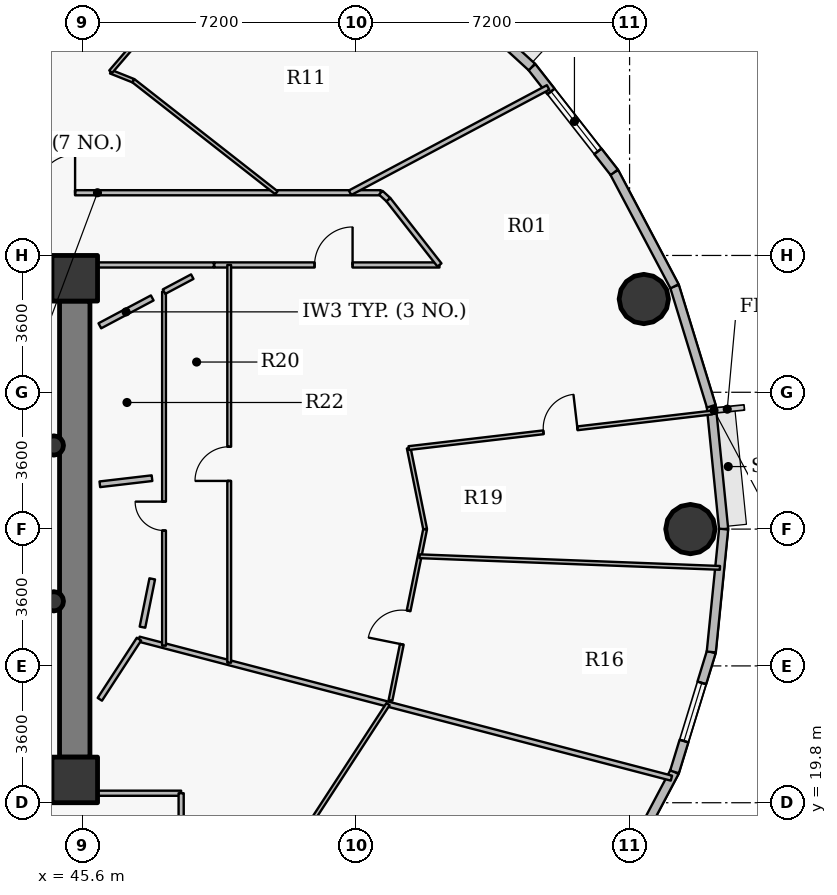
"""IFC4 building model, lengths in metres.
Left out: names, types, materials, properties, quantities, classifications, styles, units other than length and angle.
Written with IfcOpenShell. Run it as: python <this file> out.ifc"""

import sys

from ifc_helpers import new_model, si_unit, direction, frame, frame_2d, origin, origin_2d, place, context, subcontext, project, spatial, rectangle, hollow_circle, extrude, source, transform, mapped, element, fill, save


model = new_model("IFC4")
c1 = context("Model", 3, precision=1e-05, world=origin(), true_north=direction((0.0, 1.0)))
c2 = subcontext(c1, "Body", "Model", "MODEL_VIEW")
j1 = project(units=[si_unit("LENGTHUNIT", "METRE"), si_unit("PLANEANGLEUNIT", "RADIAN")], contexts=[c1])
p1 = place(None, origin())
s1 = spatial("IfcSite", under=j1, at=p1, CompositionType="ELEMENT")
p2 = place(p1, origin())
s2 = spatial("IfcBuilding", under=s1, at=p2, CompositionType="ELEMENT")
p3 = place(p2, frame((0.0, 0.0, 182.4)))
s3 = spatial("IfcBuildingStorey", under=s2, at=p3, CompositionType="ELEMENT", Elevation=182.4)
for number, where, z_axis, x_axis in (
    (1, (45.4, 20.4, 0.0), (0.0, 0.0, 1.0), (1.0, 0.0, 0.0)),
    (2, (45.4, 33.6, 0.0), (0.0, 0.0, 1.0), (1.0, 0.0, 0.0)),
):
    element("IfcColumn", number, at=place(p3, frame(where, z_axis=z_axis, x_axis=x_axis)), inside=s3, PredefinedType="COLUMN", context=c2, shape_type="SweptSolid", body=[
        extrude(rectangle(XDim=1.2, YDim=1.2, at=origin_2d()), origin(), (0.0, 0.0, 1.0), 3.75),
    ])
p4 = place(p3, frame((45.4, 33.0, 0.0), z_axis=(0.0, 0.0, 1.0), x_axis=(0.0, -1.0, 0.0)))
e3 = element("IfcWall", 3, at=p4, inside=s3, PredefinedType="SHEAR", context=c2, shape_type="SweptSolid", body=[
    extrude(rectangle(XDim=12.0, YDim=0.8, at=frame_2d((6.0, 0.0))), origin(), (0.0, 0.0, 1.0), 2.95),
])
for number, where, z_axis, x_axis in (
    (4, (61.6, 27.0, 0.0), (0.0, 0.0, 1.0), (1.0, 0.0, 0.0)),
    (5, (60.375, 33.053, 0.0), (0.0, 0.0, 1.0), (1.0, 0.0, 0.0)),
):
    element("IfcColumn", number, at=place(p3, frame(where, z_axis=z_axis, x_axis=x_axis)), inside=s3, PredefinedType="COLUMN", context=c2, shape_type="SweptSolid", body=[
        extrude(hollow_circle(Radius=0.65, WallThickness=0.04, at=origin_2d()), origin(), (0.0, 0.0, 1.0), 3.75),
    ])
for number, where, z_axis, x_axis in (
    (6, (44.85, 25.1, 0.0), (0.0, 0.0, 1.0), (1.0, 0.0, 0.0)),
    (7, (44.85, 29.2, 0.0), (0.0, 0.0, 1.0), (1.0, 0.0, 0.0)),
):
    element("IfcColumn", number, at=place(p3, frame(where, z_axis=z_axis, x_axis=x_axis)), inside=s3, PredefinedType="COLUMN", context=c2, shape_type="SweptSolid", body=[
        extrude(hollow_circle(Radius=0.254, WallThickness=0.02, at=origin_2d()), origin(), (0.0, 0.0, 1.0), 3.75),
    ])
p5 = place(p3, frame((62.15, 30.234, 0.0), z_axis=(0.0, 0.0, 1.0), x_axis=(0.100061534614, -0.994981250723, 0.0)))
e8 = element("IfcWall", 8, at=p5, inside=s3, PredefinedType="SOLIDWALL", context=c2, shape_type="SweptSolid", body=[
    extrude(rectangle(XDim=3.25, YDim=0.24, at=frame_2d((1.625, 0.0))), origin(), (0.0, 0.0, 1.0), 3.5),
])
p6 = place(p3, frame((61.183, 33.389, 0.0), z_axis=(0.0, 0.0, 1.0), x_axis=(0.293097995113, -0.956082405058, 0.0)))
e9 = element("IfcWall", 9, at=p6, inside=s3, PredefinedType="SOLIDWALL", context=c2, shape_type="SweptSolid", body=[
    extrude(rectangle(XDim=3.3, YDim=0.24, at=frame_2d((1.65, 0.0))), origin(), (0.0, 0.0, 1.0), 3.5),
])
p7 = place(p3, frame((59.596, 36.388, 0.0), z_axis=(0.0, 0.0, 1.0), x_axis=(0.467586874938, -0.88394712194, 0.0)))
e10 = element("IfcWall", 10, at=p7, inside=s3, PredefinedType="SOLIDWALL", context=c2, shape_type="SweptSolid", body=[
    extrude(rectangle(XDim=3.393, YDim=0.24, at=frame_2d((1.697, 0.0))), origin(), (0.0, 0.0, 1.0), 3.5),
])
p8 = place(p3, frame((57.428, 39.158, 0.0), z_axis=(0.0, 0.0, 1.0), x_axis=(0.616287674549, -0.787521112224, 0.0)))
e11 = element("IfcWall", 11, at=p8, inside=s3, PredefinedType="SOLIDWALL", context=c2, shape_type="SweptSolid", body=[
    extrude(rectangle(XDim=3.517, YDim=0.24, at=frame_2d((1.759, 0.0))), origin(), (0.0, 0.0, 1.0), 3.5),
])
p9 = place(p8, frame((0.819, 0.0, 0.9)))
e12 = element("IfcOpeningElement", 12, at=p9, cuts=e11, PredefinedType="OPENING", context=c2, shape_type="SweptSolid", body=[
    extrude(rectangle(XDim=2.0, YDim=1.75, at=origin_2d()), frame((1.0, 0.13, 0.875), z_axis=(0.0, -1.0, 0.0), x_axis=(1.0, 0.0, 0.0)), (0.0, 0.0, 1.0), 0.26),
])
p10 = place(p3, frame((54.732, 41.631, 0.0), z_axis=(0.0, 0.0, 1.0), x_axis=(0.737076565834, -0.675809245349, 0.0)))
e13 = element("IfcWall", 13, at=p10, inside=s3, PredefinedType="SOLIDWALL", context=c2, shape_type="SweptSolid", body=[
    extrude(rectangle(XDim=3.658, YDim=0.24, at=frame_2d((1.829, 0.0))), origin(), (0.0, 0.0, 1.0), 3.5),
])
p11 = place(p3, frame((61.183, 20.611, 0.0), z_axis=(0.0, 0.0, 1.0), x_axis=(-0.467586874938, -0.88394712194, 0.0)))
e14 = element("IfcWall", 14, at=p11, inside=s3, PredefinedType="SOLIDWALL", context=c2, shape_type="SweptSolid", body=[
    extrude(rectangle(XDim=3.393, YDim=0.24, at=frame_2d((1.697, 0.0))), origin(), (0.0, 0.0, 1.0), 3.5),
])
p12 = place(p3, frame((62.15, 23.766, 0.0), z_axis=(0.0, 0.0, 1.0), x_axis=(-0.293097995113, -0.956082405058, 0.0)))
e15 = element("IfcWall", 15, at=p12, inside=s3, PredefinedType="SOLIDWALL", context=c2, shape_type="SweptSolid", body=[
    extrude(rectangle(XDim=3.3, YDim=0.24, at=frame_2d((1.65, 0.0))), origin(), (0.0, 0.0, 1.0), 3.5),
])
p13 = place(p12, frame((0.85, 0.0, 0.9)))
e16 = element("IfcOpeningElement", 16, at=p13, cuts=e15, PredefinedType="OPENING", context=c2, shape_type="SweptSolid", body=[
    extrude(rectangle(XDim=1.6, YDim=1.75, at=origin_2d()), frame((0.8, 0.13, 0.875), z_axis=(0.0, -1.0, 0.0), x_axis=(1.0, 0.0, 0.0)), (0.0, 0.0, 1.0), 0.26),
])
p14 = place(p3, frame((62.475, 27.0, 0.0), z_axis=(0.0, 0.0, 1.0), x_axis=(-0.100061534614, -0.994981250723, 0.0)))
e17 = element("IfcWall", 17, at=p14, inside=s3, PredefinedType="SOLIDWALL", context=c2, shape_type="SweptSolid", body=[
    extrude(rectangle(XDim=3.25, YDim=0.24, at=frame_2d((1.625, 0.0))), origin(), (0.0, 0.0, 1.0), 3.5),
])
p15 = place(p3, frame((38.541, 35.85, 0.0), z_axis=(0.0, 0.0, 1.0), x_axis=(1.0, 0.0, 0.0)))
e18 = element("IfcWall", 18, at=p15, inside=s3, PredefinedType="PARTITIONING", context=c2, shape_type="SweptSolid", body=[
    extrude(rectangle(XDim=14.913, YDim=0.135, at=frame_2d((7.456, 0.0))), origin(), (0.0, 0.0, 1.0), 2.935),
])
p16 = place(p15, frame((5.868, 0.0, 0.0)))
e19 = element("IfcOpeningElement", 19, at=p16, cuts=e18, PredefinedType="OPENING", context=c2, shape_type="SweptSolid", body=[
    extrude(rectangle(XDim=1.0, YDim=2.15, at=origin_2d()), frame((0.5, 0.078, 1.075), z_axis=(0.0, -1.0, 0.0), x_axis=(1.0, 0.0, 0.0)), (0.0, 0.0, 1.0), 0.155),
])
p17 = place(p3, frame((45.8, 20.05, 0.0), z_axis=(0.0, 0.0, 1.0), x_axis=(1.0, 0.0, 0.0)))
e20 = element("IfcWall", 20, at=p17, inside=s3, PredefinedType="PARTITIONING", context=c2, shape_type="SweptSolid", body=[
    extrude(rectangle(XDim=2.4, YDim=0.135, at=frame_2d((1.2, 0.0))), origin(), (0.0, 0.0, 1.0), 3.5),
])
p18 = place(p3, frame((46.346, 39.035, 0.0), z_axis=(0.0, 0.0, 1.0), x_axis=(0.928841988182, -0.370476127423, 0.0)))
e21 = element("IfcWall", 21, at=p18, inside=s3, PredefinedType="PARTITIONING", context=c2, shape_type="SweptSolid", body=[
    extrude(rectangle(XDim=0.645, YDim=0.1, at=frame_2d((0.322, 0.0))), origin(), (0.0, 0.0, 1.0), 3.5),
])
p19 = place(p3, frame((46.346, 39.035, 0.0), z_axis=(0.0, 0.0, 1.0), x_axis=(0.651891052095, 0.758312637504, 0.0)))
e22 = element("IfcWall", 22, at=p19, inside=s3, PredefinedType="PARTITIONING", context=c2, shape_type="SweptSolid", body=[
    extrude(rectangle(XDim=6.742, YDim=0.1, at=frame_2d((3.371, 0.0))), origin(), (0.0, 0.0, 1.0), 2.935),
])
p20 = place(p19, frame((2.921, 0.0, 0.0)))
e23 = element("IfcOpeningElement", 23, at=p20, cuts=e22, PredefinedType="OPENING", context=c2, shape_type="SweptSolid", body=[
    extrude(rectangle(XDim=0.9, YDim=2.1, at=origin_2d()), frame((0.45, 0.06, 1.05), z_axis=(0.0, -1.0, 0.0), x_axis=(1.0, 0.0, 0.0)), (0.0, 0.0, 1.0), 0.12),
])
p21 = place(p3, frame((46.945, 38.796, 0.0), z_axis=(0.0, 0.0, 1.0), x_axis=(0.787326008068, -0.616536906454, 0.0)))
e24 = element("IfcWall", 24, at=p21, inside=s3, PredefinedType="PARTITIONING", context=c2, shape_type="SweptSolid", body=[
    extrude(rectangle(XDim=4.779, YDim=0.1, at=frame_2d((2.389, 0.0))), origin(), (0.0, 0.0, 1.0), 2.935),
])
p22 = place(p3, frame((47.09, 24.105, 0.0), z_axis=(0.0, 0.0, 1.0), x_axis=(0.967573213792, -0.252590728159, 0.0)))
e25 = element("IfcWall", 25, at=p22, inside=s3, PredefinedType="PARTITIONING", context=c2, shape_type="SweptSolid", body=[
    extrude(rectangle(XDim=14.481, YDim=0.135, at=frame_2d((7.24, 0.0))), origin(), (0.0, 0.0, 1.0), 2.935),
])
p23 = place(p3, frame((47.749, 23.933, 0.0), z_axis=(0.0, 0.0, 1.0), x_axis=(0.0, 1.0, 0.0)))
e26 = element("IfcWall", 26, at=p23, inside=s3, PredefinedType="PARTITIONING", context=c2, shape_type="SweptSolid", body=[
    extrude(rectangle(XDim=9.314, YDim=0.1, at=frame_2d((4.657, 0.0))), origin(), (0.0, 0.0, 1.0), 2.935),
])
p24 = place(p23, frame((3.03, 0.0, 0.0)))
e27 = element("IfcOpeningElement", 27, at=p24, cuts=e26, PredefinedType="OPENING", context=c2, shape_type="SweptSolid", body=[
    extrude(rectangle(XDim=0.76, YDim=2.1, at=origin_2d()), frame((0.38, 0.06, 1.05), z_axis=(0.0, -1.0, 0.0), x_axis=(1.0, 0.0, 0.0)), (0.0, 0.0, 1.0), 0.12),
])
p25 = place(p3, frame((48.2, 18.15, 0.0), z_axis=(0.0, 0.0, 1.0), x_axis=(0.0, 1.0, 0.0)))
e28 = element("IfcWall", 28, at=p25, inside=s3, PredefinedType="PARTITIONING", context=c2, shape_type="SweptSolid", body=[
    extrude(rectangle(XDim=1.9, YDim=0.135, at=frame_2d((0.95, 0.0))), origin(), (0.0, 0.0, 1.0), 3.5),
])
p26 = place(p3, frame((49.071, 33.95, 0.0), z_axis=(0.0, 0.0, 1.0), x_axis=(1.0, 0.0, 0.0)))
e29 = element("IfcWall", 29, at=p26, inside=s3, PredefinedType="PARTITIONING", context=c2, shape_type="SweptSolid", body=[
    extrude(rectangle(XDim=5.926, YDim=0.135, at=frame_2d((2.963, 0.0))), origin(), (0.0, 0.0, 1.0), 3.5),
])
p27 = place(p26, frame((2.64, 0.0, 0.0)))
e30 = element("IfcOpeningElement", 30, at=p27, cuts=e29, PredefinedType="OPENING", context=c2, shape_type="SweptSolid", body=[
    extrude(rectangle(XDim=1.0, YDim=2.15, at=origin_2d()), frame((0.5, 0.078, 1.075), z_axis=(0.0, -1.0, 0.0), x_axis=(1.0, 0.0, 0.0)), (0.0, 0.0, 1.0), 0.155),
])
p28 = place(p3, frame((49.464, 23.485, 0.0), z_axis=(0.0, 0.0, 1.0), x_axis=(0.0, 1.0, 0.0)))
e31 = element("IfcWall", 31, at=p28, inside=s3, PredefinedType="PARTITIONING", context=c2, shape_type="SweptSolid", body=[
    extrude(rectangle(XDim=10.465, YDim=0.1, at=frame_2d((5.232, 0.0))), origin(), (0.0, 0.0, 1.0), 2.935),
])
p29 = place(p28, frame((4.783, 0.0, 0.0)))
e32 = element("IfcOpeningElement", 32, at=p29, cuts=e31, PredefinedType="OPENING", context=c2, shape_type="SweptSolid", body=[
    extrude(rectangle(XDim=0.9, YDim=2.1, at=origin_2d()), frame((0.45, 0.06, 1.05), z_axis=(0.0, -1.0, 0.0), x_axis=(1.0, 0.0, 0.0)), (0.0, 0.0, 1.0), 0.12),
])
p30 = place(p3, frame((51.064, 18.429, 0.0), z_axis=(0.0, 0.0, 1.0), x_axis=(0.545362062942, 0.838200584767, 0.0)))
e33 = element("IfcWall", 33, at=p30, inside=s3, PredefinedType="PARTITIONING", context=c2, shape_type="SweptSolid", body=[
    extrude(rectangle(XDim=4.729, YDim=0.1, at=frame_2d((2.365, 0.0))), origin(), (0.0, 0.0, 1.0), 2.935),
])
p31 = place(p3, frame((52.645, 35.85, 0.0), z_axis=(0.0, 0.0, 1.0), x_axis=(0.882944268091, 0.469477815712, 0.0)))
e34 = element("IfcWall", 34, at=p31, inside=s3, PredefinedType="PARTITIONING", context=c2, shape_type="SweptSolid", body=[
    extrude(rectangle(XDim=5.902, YDim=0.135, at=frame_2d((2.951, 0.0))), origin(), (0.0, 0.0, 1.0), 2.935),
])
p32 = place(p3, frame((53.454, 35.85, 0.0), z_axis=(0.0, 0.0, 1.0), x_axis=(0.736667385572, -0.676255249913, 0.0)))
e35 = element("IfcWall", 35, at=p32, inside=s3, PredefinedType="PARTITIONING", context=c2, shape_type="SweptSolid", body=[
    extrude(rectangle(XDim=0.271, YDim=0.135, at=frame_2d((0.135, 0.0))), origin(), (0.0, 0.0, 1.0), 3.5),
])
p33 = place(p3, frame((53.653, 35.667, 0.0), z_axis=(0.0, 0.0, 1.0), x_axis=(0.616302223209, -0.787509726713, 0.0)))
e36 = element("IfcWall", 36, at=p33, inside=s3, PredefinedType="PARTITIONING", context=c2, shape_type="SweptSolid", body=[
    extrude(rectangle(XDim=2.18, YDim=0.135, at=frame_2d((1.09, 0.0))), origin(), (0.0, 0.0, 1.0), 3.5),
])
p34 = place(p3, frame((53.709, 22.494, 0.0), z_axis=(0.0, 0.0, 1.0), x_axis=(0.198239863178, 0.980153537282, 0.0)))
e37 = element("IfcWall", 37, at=p34, inside=s3, PredefinedType="PARTITIONING", context=c2, shape_type="SweptSolid", body=[
    extrude(rectangle(XDim=4.597, YDim=0.1, at=frame_2d((2.299, 0.0))), origin(), (0.0, 0.0, 1.0), 2.935),
])
p35 = place(p34, frame((1.504, 0.0, 0.0)))
e38 = element("IfcOpeningElement", 38, at=p35, cuts=e37, PredefinedType="OPENING", context=c2, shape_type="SweptSolid", body=[
    extrude(rectangle(XDim=0.9, YDim=2.1, at=origin_2d()), frame((0.45, 0.06, 1.05), z_axis=(0.0, -1.0, 0.0), x_axis=(1.0, 0.0, 0.0)), (0.0, 0.0, 1.0), 0.12),
])
p36 = place(p3, frame((54.189, 29.132, 0.0), z_axis=(0.0, 0.0, 1.0), x_axis=(0.198252946245, -0.98015089109, 0.0)))
e39 = element("IfcWall", 39, at=p36, inside=s3, PredefinedType="PARTITIONING", context=c2, shape_type="SweptSolid", body=[
    extrude(rectangle(XDim=2.175, YDim=0.1, at=frame_2d((1.087, 0.0))), origin(), (0.0, 0.0, 1.0), 2.935),
])
p37 = place(p3, frame((54.189, 29.132, 0.0), z_axis=(0.0, 0.0, 1.0), x_axis=(0.993202342674, 0.116400629328, 0.0)))
e40 = element("IfcWall", 40, at=p37, inside=s3, PredefinedType="PARTITIONING", context=c2, shape_type="SweptSolid", body=[
    extrude(rectangle(XDim=8.037, YDim=0.1, at=frame_2d((4.019, 0.0))), origin(), (0.0, 0.0, 1.0), 2.935),
])
p38 = place(p37, frame((3.569, 0.0, 0.0)))
e41 = element("IfcOpeningElement", 41, at=p38, cuts=e40, PredefinedType="OPENING", context=c2, shape_type="SweptSolid", body=[
    extrude(rectangle(XDim=0.9, YDim=2.1, at=origin_2d()), frame((0.45, 0.06, 1.05), z_axis=(0.0, -1.0, 0.0), x_axis=(1.0, 0.0, 0.0)), (0.0, 0.0, 1.0), 0.12),
])
p39 = place(p3, frame((54.475, 26.285, 0.0), z_axis=(0.0, 0.0, 1.0), x_axis=(0.999251521297, -0.03868329336, 0.0)))
e42 = element("IfcWall", 42, at=p39, inside=s3, PredefinedType="PARTITIONING", context=c2, shape_type="SweptSolid", body=[
    extrude(rectangle(XDim=7.908, YDim=0.1, at=frame_2d((3.954, 0.0))), origin(), (0.0, 0.0, 1.0), 2.935),
])
p40 = place(p3, frame((49.061, 33.95, 0.0), z_axis=(0.0, 0.0, 1.0), x_axis=(-1.0, 0.0, 0.0)))
e43 = element("IfcWall", 43, at=p40, inside=s3, PredefinedType="PARTITIONING", context=c2, shape_type="SweptSolid", body=[
    extrude(rectangle(XDim=3.261, YDim=0.135, at=frame_2d((1.63, 0.0))), origin(), (0.0, 0.0, 1.0), 3.5),
])
for number, where, z_axis, x_axis in (
    (44, (45.79, 34.0, 0.0), (0.0, 0.0, 1.0), (-1.0, 0.0, 0.0)),
    (45, (44.81, 20.0, 0.0), (0.0, 0.0, 1.0), (1.0, 0.0, 0.0)),
):
    element("IfcWall", number, at=place(p3, frame(where, z_axis=z_axis, x_axis=x_axis)), inside=s3, PredefinedType="PARTITIONING", context=c2, shape_type="SweptSolid", body=[
        extrude(rectangle(XDim=0.98, YDim=0.135, at=frame_2d((0.49, 0.0))), origin(), (0.0, 0.0, 1.0), 2.935),
    ])
p41 = place(p3, frame((45.8, 20.377, 0.0), z_axis=(0.0, 0.0, 1.0), x_axis=(0.0, 1.0, 0.0)))
e46 = element("IfcWall", 46, at=p41, inside=s3, PredefinedType="PARTITIONING", context=c2, shape_type="SweptSolid", body=[
    extrude(rectangle(XDim=0.613, YDim=0.135, at=frame_2d((0.306, 0.0))), origin(), (0.0, 0.0, 1.0), 3.5),
])
p42 = place(p3, frame((46.06, 22.521, 0.0), z_axis=(0.0, 0.0, 1.0), x_axis=(0.545329049498, 0.838222063521, 0.0)))
e47 = element("IfcWall", 47, at=p42, inside=s3, PredefinedType="PARTITIONING", context=c2, shape_type="SweptSolid", body=[
    extrude(rectangle(XDim=1.889, YDim=0.135, at=frame_2d((0.944, 0.0))), origin(), (0.0, 0.0, 1.0), 2.935),
])
p43 = place(p3, frame((47.433, 28.34, 0.0), z_axis=(0.0, 0.0, 1.0), x_axis=(-0.993204743367, -0.116380143293, 0.0)))
e48 = element("IfcWall", 48, at=p43, inside=s3, PredefinedType="PARTITIONING", context=c2, shape_type="SweptSolid", body=[
    extrude(rectangle(XDim=1.382, YDim=0.15, at=frame_2d((0.691, 0.0))), origin(), (0.0, 0.0, 1.0), 3.5),
])
p44 = place(p3, frame((46.06, 32.349, 0.0), z_axis=(0.0, 0.0, 1.0), x_axis=(0.882988187469, 0.469395207465, 0.0)))
e49 = element("IfcWall", 49, at=p44, inside=s3, PredefinedType="PARTITIONING", context=c2, shape_type="SweptSolid", body=[
    extrude(rectangle(XDim=1.562, YDim=0.15, at=frame_2d((0.781, 0.0))), origin(), (0.0, 0.0, 1.0), 3.5),
])
p45 = place(p3, frame((47.182, 24.419, 0.0), z_axis=(0.0, 0.0, 1.0), x_axis=(0.198178705385, 0.980165904698, 0.0)))
e50 = element("IfcWall", 50, at=p45, inside=s3, PredefinedType="PARTITIONING", context=c2, shape_type="SweptSolid", body=[
    extrude(rectangle(XDim=1.297, YDim=0.15, at=frame_2d((0.648, 0.0))), origin(), (0.0, 0.0, 1.0), 3.5),
])
p46 = place(p3, frame((47.749, 33.247, 0.0), z_axis=(0.0, 0.0, 1.0), x_axis=(0.882834022315, 0.469685095616, 0.0)))
e51 = element("IfcWall", 51, at=p46, inside=s3, PredefinedType="PARTITIONING", context=c2, shape_type="SweptSolid", body=[
    extrude(rectangle(XDim=0.842, YDim=0.135, at=frame_2d((0.421, 0.0))), origin(), (0.0, 0.0, 1.0), 3.5),
])
m1 = source(origin(), c2, "Body", "SweptSolid", [
    extrude(rectangle(XDim=2.0, YDim=1.75, at=origin_2d()), frame((1.0, 0.03, 0.875), z_axis=(0.0, -1.0, 0.0), x_axis=(1.0, 0.0, 0.0)), (0.0, 0.0, 1.0), 0.06),
])
p47 = place(p9, origin())
e52 = element("IfcWindow", 52, at=p47, inside=s3, PartitioningType="DOUBLE_PANEL_VERTICAL", PredefinedType="WINDOW", context=c2, shape_type="MappedRepresentation", body=[
    mapped(m1, transform((0.0, 0.0, 0.0), x_axis=(1.0, 0.0, 0.0), y_axis=(0.0, 1.0, 0.0), z_axis=(0.0, 0.0, 1.0), scale=1.0)),
])
fill(e12, e52)
m2 = source(origin(), c2, "Body", "SweptSolid", [
    extrude(rectangle(XDim=1.6, YDim=1.75, at=origin_2d()), frame((0.8, 0.03, 0.875), z_axis=(0.0, -1.0, 0.0), x_axis=(1.0, 0.0, 0.0)), (0.0, 0.0, 1.0), 0.06),
])
p48 = place(p13, origin())
e53 = element("IfcWindow", 53, at=p48, inside=s3, PartitioningType="DOUBLE_PANEL_VERTICAL", PredefinedType="WINDOW", context=c2, shape_type="MappedRepresentation", body=[
    mapped(m2, transform((0.0, 0.0, 0.0), x_axis=(1.0, 0.0, 0.0), y_axis=(0.0, 1.0, 0.0), z_axis=(0.0, 0.0, 1.0), scale=1.0)),
])
fill(e16, e53)
m3 = source(origin(), c2, "Body", "SweptSolid", [
    extrude(rectangle(XDim=1.0, YDim=2.15, at=origin_2d()), frame((0.5, 0.025, 1.075), z_axis=(0.0, -1.0, 0.0), x_axis=(1.0, 0.0, 0.0)), (0.0, 0.0, 1.0), 0.05),
])
p49 = place(p16, origin())
e54 = element("IfcDoor", 54, at=p49, inside=s3, OperationType="SINGLE_SWING_RIGHT", PredefinedType="DOOR", context=c2, shape_type="MappedRepresentation", body=[
    mapped(m3, transform((0.0, 0.0, 0.0), x_axis=(1.0, 0.0, 0.0), y_axis=(0.0, 1.0, 0.0), z_axis=(0.0, 0.0, 1.0), scale=1.0)),
])
fill(e19, e54)
p50 = place(p27, origin())
e55 = element("IfcDoor", 55, at=p50, inside=s3, OperationType="SINGLE_SWING_RIGHT", PredefinedType="DOOR", context=c2, shape_type="MappedRepresentation", body=[
    mapped(m3, transform((0.0, 0.0, 0.0), x_axis=(1.0, 0.0, 0.0), y_axis=(0.0, 1.0, 0.0), z_axis=(0.0, 0.0, 1.0), scale=1.0)),
])
fill(e30, e55)
m4 = source(origin(), c2, "Body", "SweptSolid", [
    extrude(rectangle(XDim=0.9, YDim=2.1, at=origin_2d()), frame((0.45, 0.025, 1.05), z_axis=(0.0, -1.0, 0.0), x_axis=(1.0, 0.0, 0.0)), (0.0, 0.0, 1.0), 0.05),
])
p51 = place(p35, origin())
e56 = element("IfcDoor", 56, at=p51, inside=s3, OperationType="SINGLE_SWING_LEFT", PredefinedType="DOOR", context=c2, shape_type="MappedRepresentation", body=[
    mapped(m4, transform((0.0, 0.0, 0.0), x_axis=(1.0, 0.0, 0.0), y_axis=(0.0, 1.0, 0.0), z_axis=(0.0, 0.0, 1.0), scale=1.0)),
])
fill(e38, e56)
p52 = place(p38, origin())
e57 = element("IfcDoor", 57, at=p52, inside=s3, OperationType="SINGLE_SWING_RIGHT", PredefinedType="DOOR", context=c2, shape_type="MappedRepresentation", body=[
    mapped(m4, transform((0.0, 0.0, 0.0), x_axis=(1.0, 0.0, 0.0), y_axis=(0.0, 1.0, 0.0), z_axis=(0.0, 0.0, 1.0), scale=1.0)),
])
fill(e41, e57)
p53 = place(p29, origin())
e58 = element("IfcDoor", 58, at=p53, inside=s3, OperationType="SINGLE_SWING_LEFT", PredefinedType="DOOR", context=c2, shape_type="MappedRepresentation", body=[
    mapped(m4, transform((0.0, 0.0, 0.0), x_axis=(1.0, 0.0, 0.0), y_axis=(0.0, 1.0, 0.0), z_axis=(0.0, 0.0, 1.0), scale=1.0)),
])
fill(e32, e58)
m5 = source(origin(), c2, "Body", "SweptSolid", [
    extrude(rectangle(XDim=0.76, YDim=2.1, at=origin_2d()), frame((0.38, 0.025, 1.05), z_axis=(0.0, -1.0, 0.0), x_axis=(1.0, 0.0, 0.0)), (0.0, 0.0, 1.0), 0.05),
])
p54 = place(p24, origin())
e59 = element("IfcDoor", 59, at=p54, inside=s3, OperationType="SINGLE_SWING_RIGHT", PredefinedType="DOOR", context=c2, shape_type="MappedRepresentation", body=[
    mapped(m5, transform((0.0, 0.0, 0.0), x_axis=(1.0, 0.0, 0.0), y_axis=(0.0, 1.0, 0.0), z_axis=(0.0, 0.0, 1.0), scale=1.0)),
])
fill(e27, e59)
save(model, sys.argv[1])
